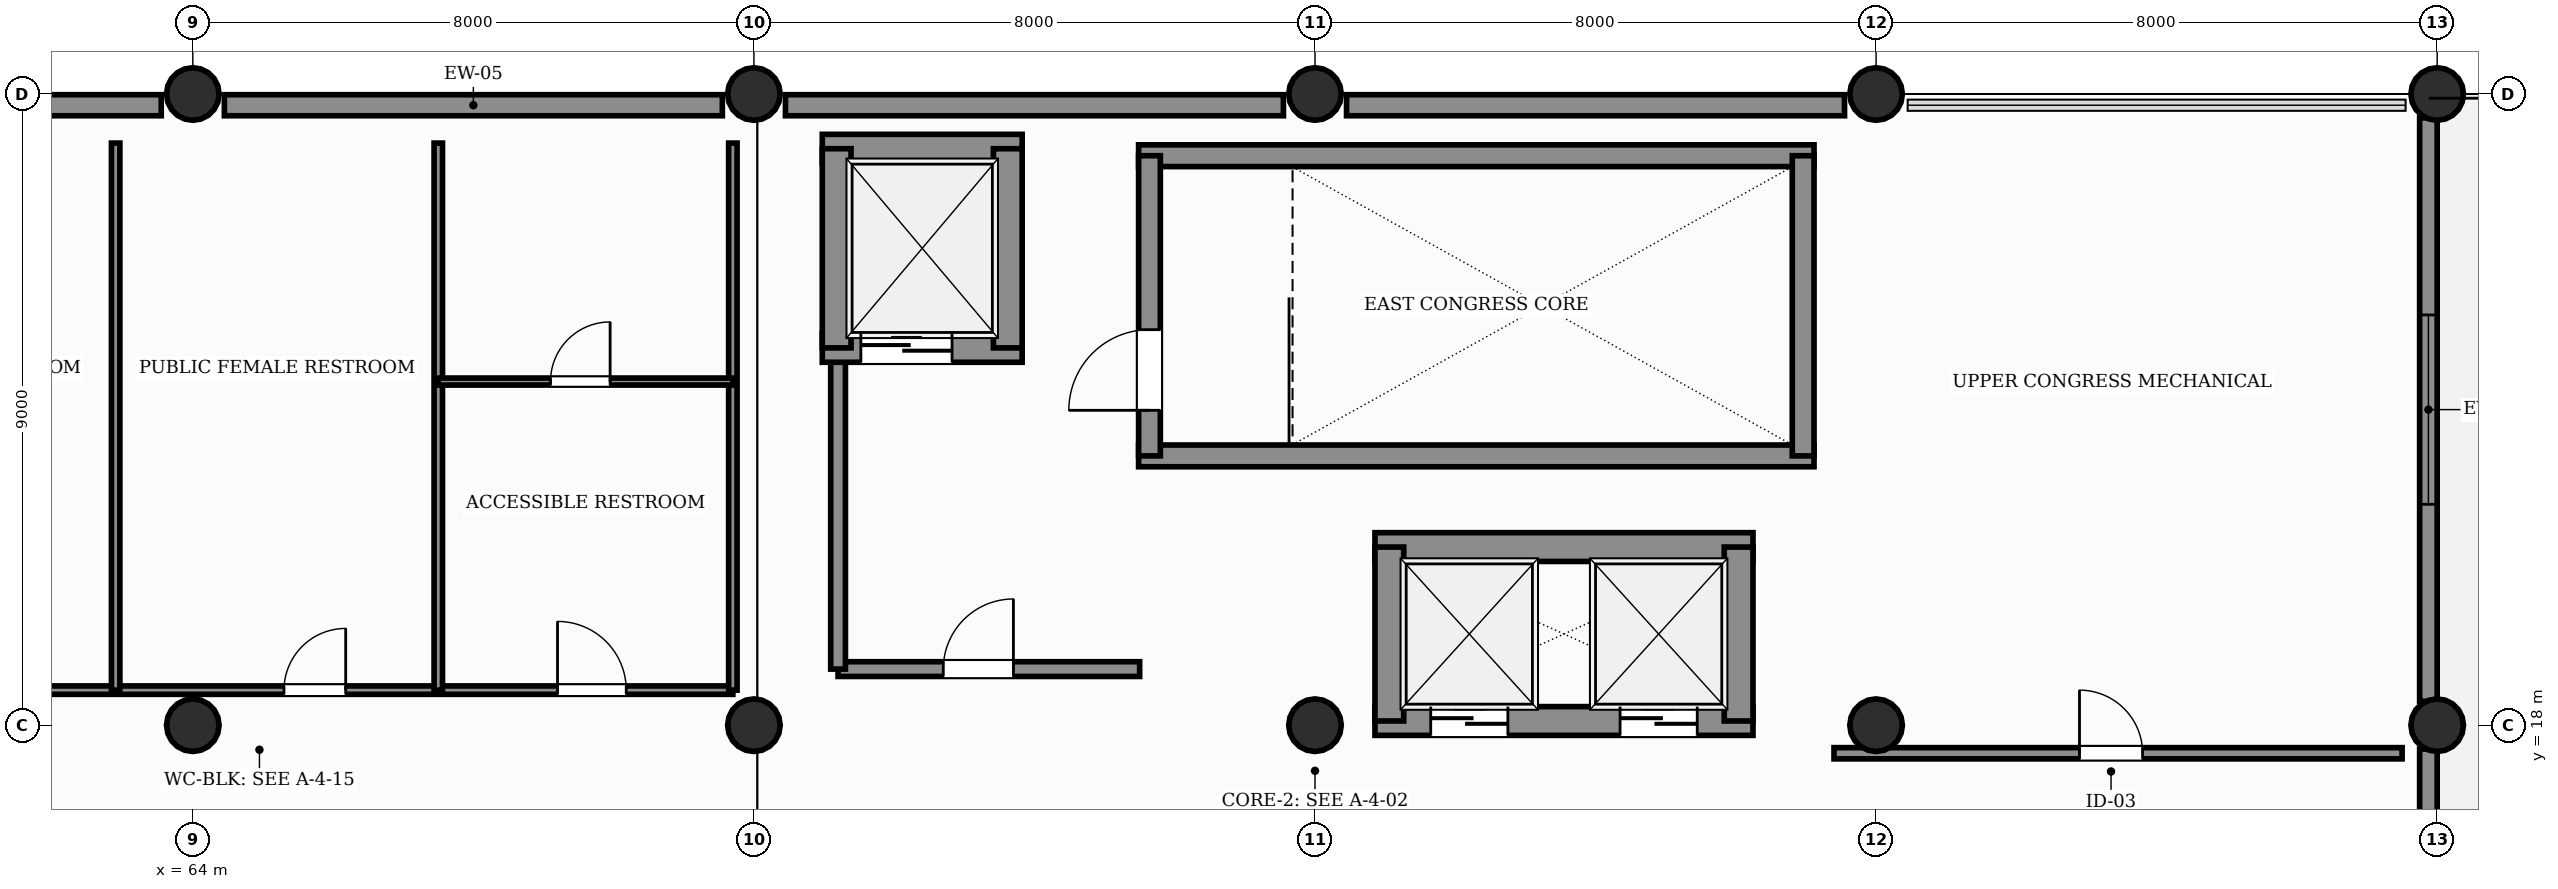
"""IFC4 building model, lengths in metres.
Left out: names, types, materials, properties, quantities, classifications, styles, units other than length and angle.
Written with IfcOpenShell. Run it as: python <this file> out.ifc"""

import sys

from ifc_helpers import new_model, si_unit, direction, frame, frame_2d, origin, origin_2d, place, context, subcontext, project, spatial, rectangle, circle, extrude, element, fill, save


model = new_model("IFC4")
c1 = context("Model", 3, precision=1e-05, world=origin(), true_north=direction((0.0, 1.0)))
c2 = subcontext(c1, "Body", "Model", "MODEL_VIEW")
j1 = project(units=[si_unit("LENGTHUNIT", "METRE"), si_unit("PLANEANGLEUNIT", "RADIAN")], contexts=[c1])
p1 = place(None, origin())
s1 = spatial("IfcSite", under=j1, at=p1, CompositionType="ELEMENT")
p2 = place(p1, origin())
s2 = spatial("IfcBuilding", under=s1, at=p2, CompositionType="ELEMENT")
p3 = place(p2, frame((0.0, 0.0, 21.0)))
s3 = spatial("IfcBuildingStorey", under=s2, at=p3, CompositionType="ELEMENT", Elevation=21.0)
for number, where, z_axis, x_axis in (
    (1, (64.0, 18.0, 0.0), (0.0, 0.0, 1.0), (1.0, 0.0, 0.0)),
    (2, (64.0, 27.0, 0.0), (0.0, 0.0, 1.0), (1.0, 0.0, 0.0)),
    (3, (72.0, 18.0, 0.0), (0.0, 0.0, 1.0), (1.0, 0.0, 0.0)),
    (4, (72.0, 27.0, 0.0), (0.0, 0.0, 1.0), (1.0, 0.0, 0.0)),
    (5, (80.0, 18.0, 0.0), (0.0, 0.0, 1.0), (1.0, 0.0, 0.0)),
    (6, (80.0, 27.0, 0.0), (0.0, 0.0, 1.0), (1.0, 0.0, 0.0)),
    (7, (88.0, 18.0, 0.0), (0.0, 0.0, 1.0), (1.0, 0.0, 0.0)),
    (8, (88.0, 27.0, 0.0), (0.0, 0.0, 1.0), (1.0, 0.0, 0.0)),
    (9, (96.0, 18.0, 0.0), (0.0, 0.0, 1.0), (1.0, 0.0, 0.0)),
    (10, (96.0, 27.0, 0.0), (0.0, 0.0, 1.0), (1.0, 0.0, 0.0)),
):
    element("IfcColumn", number, at=place(p3, frame(where, z_axis=z_axis, x_axis=x_axis)), inside=s3, PredefinedType="COLUMN", context=c2, shape_type="SweptSolid", body=[
        extrude(circle(Radius=0.375, at=origin_2d()), origin(), (0.0, 0.0, 1.0), 4.8),
    ])
for number, where, z_axis, x_axis in (
    (11, (56.45, 26.84, 0.0), (0.0, 0.0, 1.0), (1.0, 0.0, 0.0)),
    (12, (64.45, 26.84, 0.0), (0.0, 0.0, 1.0), (1.0, 0.0, 0.0)),
    (13, (72.45, 26.84, 0.0), (0.0, 0.0, 1.0), (1.0, 0.0, 0.0)),
    (14, (80.45, 26.84, 0.0), (0.0, 0.0, 1.0), (1.0, 0.0, 0.0)),
):
    element("IfcWall", number, at=place(p3, frame(where, z_axis=z_axis, x_axis=x_axis)), inside=s3, PredefinedType="SOLIDWALL", context=c2, shape_type="SweptSolid", body=[
        extrude(rectangle(XDim=7.1, YDim=0.3, at=frame_2d((3.55, 0.0))), origin(), (0.0, 0.0, 1.0), 3.68),
    ])
p4 = place(p3, frame((95.875, 9.34, 0.0), z_axis=(0.0, 0.0, 1.0), x_axis=(0.0, 1.0, 0.0)))
e15 = element("IfcWall", 15, at=p4, inside=s3, PredefinedType="SOLIDWALL", context=c2, shape_type="SweptSolid", body=[
    extrude(rectangle(XDim=8.32, YDim=0.25, at=frame_2d((4.16, 0.0))), origin(), (0.0, 0.0, 1.0), 3.68),
])
p5 = place(p4, frame((3.26, 0.0, 0.0)))
e16 = element("IfcOpeningElement", 16, at=p5, cuts=e15, PredefinedType="OPENING", context=c2, shape_type="SweptSolid", body=[
    extrude(rectangle(XDim=1.8, YDim=2.4, at=frame_2d((0.9, 1.2))), frame((0.0, 0.135, 0.0), z_axis=(0.0, -1.0, 0.0), x_axis=(1.0, 0.0, 0.0)), (0.0, 0.0, 1.0), 0.27),
])
p6 = place(p3, frame((95.875, 18.34, 0.0), z_axis=(0.0, 0.0, 1.0), x_axis=(0.0, 1.0, 0.0)))
e17 = element("IfcWall", 17, at=p6, inside=s3, PredefinedType="SOLIDWALL", context=c2, shape_type="SweptSolid", body=[
    extrude(rectangle(XDim=8.32, YDim=0.25, at=frame_2d((4.16, 0.0))), origin(), (0.0, 0.0, 1.0), 3.68),
])
p7 = place(p6, frame((2.81, 0.0, 0.95)))
e18 = element("IfcOpeningElement", 18, at=p7, cuts=e17, PredefinedType="OPENING", context=c2, shape_type="SweptSolid", body=[
    extrude(rectangle(XDim=2.7, YDim=2.05, at=frame_2d((1.35, 1.025))), frame((0.0, 0.135, 0.0), z_axis=(0.0, -1.0, 0.0), x_axis=(1.0, 0.0, 0.0)), (0.0, 0.0, 1.0), 0.27),
])
for number, where, z_axis, x_axis in (
    (19, (77.485, 21.84, 0.0), (0.0, 0.0, 1.0), (1.0, 0.0, 0.0)),
    (20, (77.485, 26.12, 0.0), (0.0, 0.0, 1.0), (1.0, 0.0, 0.0)),
):
    element("IfcWall", number, at=place(p3, frame(where, z_axis=z_axis, x_axis=x_axis)), inside=s3, PredefinedType="SHEAR", context=c2, shape_type="SweptSolid", body=[
        extrude(rectangle(XDim=9.63, YDim=0.31, at=frame_2d((4.815, 0.0))), origin(), (0.0, 0.0, 1.0), 4.8),
    ])
p8 = place(p3, frame((77.64, 21.84, 0.0), z_axis=(0.0, 0.0, 1.0), x_axis=(0.0, 1.0, 0.0)))
e21 = element("IfcWall", 21, at=p8, inside=s3, PredefinedType="SHEAR", context=c2, shape_type="SweptSolid", body=[
    extrude(rectangle(XDim=4.28, YDim=0.31, at=frame_2d((2.14, 0.0))), origin(), (0.0, 0.0, 1.0), 4.8),
])
p9 = place(p8, frame((0.65, 0.0, 0.0)))
e22 = element("IfcOpeningElement", 22, at=p9, cuts=e21, PredefinedType="OPENING", context=c2, shape_type="SweptSolid", body=[
    extrude(rectangle(XDim=1.15, YDim=2.2, at=frame_2d((0.575, 1.1))), frame((0.0, 0.165, 0.0), z_axis=(0.0, -1.0, 0.0), x_axis=(1.0, 0.0, 0.0)), (0.0, 0.0, 1.0), 0.33),
])
p10 = place(p3, frame((86.96, 21.84, 0.0), z_axis=(0.0, 0.0, 1.0), x_axis=(0.0, 1.0, 0.0)))
e23 = element("IfcWall", 23, at=p10, inside=s3, PredefinedType="SHEAR", context=c2, shape_type="SweptSolid", body=[
    extrude(rectangle(XDim=4.28, YDim=0.31, at=frame_2d((2.14, 0.0))), origin(), (0.0, 0.0, 1.0), 4.8),
])
p11 = place(p3, frame((73.2, 18.8, 0.0), z_axis=(0.0, 0.0, 1.0), x_axis=(1.0, 0.0, 0.0)))
e24 = element("IfcWall", 24, at=p11, inside=s3, PredefinedType="PARTITIONING", context=c2, shape_type="SweptSolid", body=[
    extrude(rectangle(XDim=4.3, YDim=0.21, at=frame_2d((2.15, 0.0))), origin(), (0.0, 0.0, 1.0), 3.6),
])
p12 = place(p11, frame((1.5, 0.0, 0.0)))
e25 = element("IfcOpeningElement", 25, at=p12, cuts=e24, PredefinedType="OPENING", context=c2, shape_type="SweptSolid", body=[
    extrude(rectangle(XDim=1.0, YDim=2.15, at=frame_2d((0.5, 1.075))), frame((0.0, 0.115, 0.0), z_axis=(0.0, -1.0, 0.0), x_axis=(1.0, 0.0, 0.0)), (0.0, 0.0, 1.0), 0.23),
])
p13 = place(p3, frame((73.2, 18.8, 0.0), z_axis=(0.0, 0.0, 1.0), x_axis=(0.0, 1.0, 0.0)))
e26 = element("IfcWall", 26, at=p13, inside=s3, PredefinedType="PARTITIONING", context=c2, shape_type="SweptSolid", body=[
    extrude(rectangle(XDim=4.6, YDim=0.21, at=frame_2d((2.3, 0.0))), origin(), (0.0, 0.0, 1.0), 3.6),
])
p14 = place(p3, frame((72.975, 23.38, 0.0), z_axis=(0.0, 0.0, 1.0), x_axis=(1.0, 0.0, 0.0)))
e27 = element("IfcWall", 27, at=p14, inside=s3, PredefinedType="SHEAR", context=c2, shape_type="SweptSolid", body=[
    extrude(rectangle(XDim=2.85, YDim=0.41, at=frame_2d((1.425, 0.0))), origin(), (0.0, 0.0, 1.0), 4.8),
])
p15 = place(p14, frame((0.55, 0.0, 0.0)))
e28 = element("IfcOpeningElement", 28, at=p15, cuts=e27, PredefinedType="OPENING", context=c2, shape_type="SweptSolid", body=[
    extrude(rectangle(XDim=1.3, YDim=2.25, at=frame_2d((0.65, 1.125))), frame((0.0, 0.215, 0.0), z_axis=(0.0, -1.0, 0.0), x_axis=(1.0, 0.0, 0.0)), (0.0, 0.0, 1.0), 0.43),
])
p16 = place(p3, frame((72.975, 26.22, 0.0), z_axis=(0.0, 0.0, 1.0), x_axis=(1.0, 0.0, 0.0)))
e29 = element("IfcWall", 29, at=p16, inside=s3, PredefinedType="SHEAR", context=c2, shape_type="SweptSolid", body=[
    extrude(rectangle(XDim=2.85, YDim=0.41, at=frame_2d((1.425, 0.0))), origin(), (0.0, 0.0, 1.0), 4.8),
])
for number, where, z_axis, x_axis in (
    (30, (73.18, 23.38, 0.0), (0.0, 0.0, 1.0), (0.0, 1.0, 0.0)),
    (31, (75.62, 23.38, 0.0), (0.0, 0.0, 1.0), (0.0, 1.0, 0.0)),
):
    element("IfcWall", number, at=place(p3, frame(where, z_axis=z_axis, x_axis=x_axis)), inside=s3, PredefinedType="SHEAR", context=c2, shape_type="SweptSolid", body=[
        extrude(rectangle(XDim=2.84, YDim=0.41, at=frame_2d((1.42, 0.0))), origin(), (0.0, 0.0, 1.0), 4.8),
    ])
p17 = place(p3, frame((80.855, 18.06, 0.0), z_axis=(0.0, 0.0, 1.0), x_axis=(1.0, 0.0, 0.0)))
e32 = element("IfcWall", 32, at=p17, inside=s3, PredefinedType="SHEAR", context=c2, shape_type="SweptSolid", body=[
    extrude(rectangle(XDim=5.39, YDim=0.41, at=frame_2d((2.695, 0.0))), origin(), (0.0, 0.0, 1.0), 4.8),
])
p18 = place(p17, frame((0.795, 0.0, 0.0)))
e33 = element("IfcOpeningElement", 33, at=p18, cuts=e32, PredefinedType="OPENING", context=c2, shape_type="SweptSolid", body=[
    extrude(rectangle(XDim=1.1, YDim=2.2, at=frame_2d((0.55, 1.1))), frame((0.0, 0.215, 0.0), z_axis=(0.0, -1.0, 0.0), x_axis=(1.0, 0.0, 0.0)), (0.0, 0.0, 1.0), 0.43),
])
p19 = place(p17, frame((3.495, 0.0, 0.0)))
e34 = element("IfcOpeningElement", 34, at=p19, cuts=e32, PredefinedType="OPENING", context=c2, shape_type="SweptSolid", body=[
    extrude(rectangle(XDim=1.1, YDim=2.2, at=frame_2d((0.55, 1.1))), frame((0.0, 0.215, 0.0), z_axis=(0.0, -1.0, 0.0), x_axis=(1.0, 0.0, 0.0)), (0.0, 0.0, 1.0), 0.43),
])
p20 = place(p3, frame((80.855, 20.54, 0.0), z_axis=(0.0, 0.0, 1.0), x_axis=(1.0, 0.0, 0.0)))
e35 = element("IfcWall", 35, at=p20, inside=s3, PredefinedType="SHEAR", context=c2, shape_type="SweptSolid", body=[
    extrude(rectangle(XDim=5.39, YDim=0.41, at=frame_2d((2.695, 0.0))), origin(), (0.0, 0.0, 1.0), 4.8),
])
for number, where, z_axis, x_axis in (
    (36, (81.06, 18.06, 0.0), (0.0, 0.0, 1.0), (0.0, 1.0, 0.0)),
    (37, (86.04, 18.06, 0.0), (0.0, 0.0, 1.0), (0.0, 1.0, 0.0)),
):
    element("IfcWall", number, at=place(p3, frame(where, z_axis=z_axis, x_axis=x_axis)), inside=s3, PredefinedType="SHEAR", context=c2, shape_type="SweptSolid", body=[
        extrude(rectangle(XDim=2.48, YDim=0.41, at=frame_2d((1.24, 0.0))), origin(), (0.0, 0.0, 1.0), 4.8),
    ])
p21 = place(p3, frame((58.3, 18.5, 0.0), z_axis=(0.0, 0.0, 1.0), x_axis=(1.0, 0.0, 0.0)))
e38 = element("IfcWall", 38, at=p21, inside=s3, PredefinedType="PARTITIONING", context=c2, shape_type="SweptSolid", body=[
    extrude(rectangle(XDim=13.4, YDim=0.12, at=frame_2d((6.7, 0.0))), origin(), (0.0, 0.0, 1.0), 3.6),
])
p22 = place(p21, frame((1.8, 0.0, 0.0)))
e39 = element("IfcOpeningElement", 39, at=p22, cuts=e38, PredefinedType="OPENING", context=c2, shape_type="SweptSolid", body=[
    extrude(rectangle(XDim=0.88, YDim=2.1, at=frame_2d((0.44, 1.05))), frame((0.0, 0.07, 0.0), z_axis=(0.0, -1.0, 0.0), x_axis=(1.0, 0.0, 0.0)), (0.0, 0.0, 1.0), 0.14),
])
p23 = place(p21, frame((7.0, 0.0, 0.0)))
e40 = element("IfcOpeningElement", 40, at=p23, cuts=e38, PredefinedType="OPENING", context=c2, shape_type="SweptSolid", body=[
    extrude(rectangle(XDim=0.88, YDim=2.1, at=frame_2d((0.44, 1.05))), frame((0.0, 0.07, 0.0), z_axis=(0.0, -1.0, 0.0), x_axis=(1.0, 0.0, 0.0)), (0.0, 0.0, 1.0), 0.14),
])
p24 = place(p21, frame((10.9, 0.0, 0.0)))
e41 = element("IfcOpeningElement", 41, at=p24, cuts=e38, PredefinedType="OPENING", context=c2, shape_type="SweptSolid", body=[
    extrude(rectangle(XDim=0.98, YDim=2.15, at=frame_2d((0.49, 1.075))), frame((0.0, 0.07, 0.0), z_axis=(0.0, -1.0, 0.0), x_axis=(1.0, 0.0, 0.0)), (0.0, 0.0, 1.0), 0.14),
])
for number, where, z_axis, x_axis in (
    (42, (62.9, 18.5, 0.0), (0.0, 0.0, 1.0), (0.0, 1.0, 0.0)),
    (43, (67.5, 18.5, 0.0), (0.0, 0.0, 1.0), (0.0, 1.0, 0.0)),
    (44, (71.7, 18.5, 0.0), (0.0, 0.0, 1.0), (0.0, 1.0, 0.0)),
):
    element("IfcWall", number, at=place(p3, frame(where, z_axis=z_axis, x_axis=x_axis)), inside=s3, PredefinedType="PARTITIONING", context=c2, shape_type="SweptSolid", body=[
        extrude(rectangle(XDim=7.8, YDim=0.12, at=frame_2d((3.9, 0.0))), origin(), (0.0, 0.0, 1.0), 3.6),
    ])
p25 = place(p3, frame((67.5, 22.9, 0.0), z_axis=(0.0, 0.0, 1.0), x_axis=(1.0, 0.0, 0.0)))
e45 = element("IfcWall", 45, at=p25, inside=s3, PredefinedType="PARTITIONING", context=c2, shape_type="SweptSolid", body=[
    extrude(rectangle(XDim=4.2, YDim=0.1, at=frame_2d((2.1, 0.0))), origin(), (0.0, 0.0, 1.0), 3.6),
])
p26 = place(p25, frame((1.6, 0.0, 0.0)))
e46 = element("IfcOpeningElement", 46, at=p26, cuts=e45, PredefinedType="OPENING", context=c2, shape_type="SweptSolid", body=[
    extrude(rectangle(XDim=0.85, YDim=2.1, at=frame_2d((0.425, 1.05))), frame((0.0, 0.06, 0.0), z_axis=(0.0, -1.0, 0.0), x_axis=(1.0, 0.0, 0.0)), (0.0, 0.0, 1.0), 0.12),
])
p27 = place(p3, frame((87.4, 17.6, 0.0), z_axis=(0.0, 0.0, 1.0), x_axis=(1.0, 0.0, 0.0)))
e47 = element("IfcWall", 47, at=p27, inside=s3, PredefinedType="PARTITIONING", context=c2, shape_type="SweptSolid", body=[
    extrude(rectangle(XDim=8.1, YDim=0.16, at=frame_2d((4.05, 0.0))), origin(), (0.0, 0.0, 1.0), 3.6),
])
p28 = place(p27, frame((3.5, 0.0, 0.0)))
e48 = element("IfcOpeningElement", 48, at=p28, cuts=e47, PredefinedType="OPENING", context=c2, shape_type="SweptSolid", body=[
    extrude(rectangle(XDim=0.9, YDim=2.15, at=frame_2d((0.45, 1.075))), frame((0.0, 0.09, 0.0), z_axis=(0.0, -1.0, 0.0), x_axis=(1.0, 0.0, 0.0)), (0.0, 0.0, 1.0), 0.18),
])
p29 = place(p7, origin())
e49 = element("IfcWindow", 49, at=p29, inside=s3, PartitioningType="SINGLE_PANEL", PredefinedType="WINDOW", context=c2, shape_type="SweptSolid", body=[
    extrude(rectangle(XDim=2.7, YDim=2.05, at=frame_2d((1.35, 1.025))), frame((0.0, 0.03, 0.0), z_axis=(0.0, -1.0, 0.0), x_axis=(1.0, 0.0, 0.0)), (0.0, 0.0, 1.0), 0.06),
])
fill(e18, e49)
p30 = place(p9, origin())
e50 = element("IfcDoor", 50, at=p30, inside=s3, OperationType="SINGLE_SWING_LEFT", PredefinedType="DOOR", context=c2, shape_type="SweptSolid", body=[
    extrude(rectangle(XDim=1.15, YDim=2.2, at=frame_2d((0.575, 1.1))), frame((0.0, 0.025, 0.0), z_axis=(0.0, -1.0, 0.0), x_axis=(1.0, 0.0, 0.0)), (0.0, 0.0, 1.0), 0.05),
])
fill(e22, e50)
p31 = place(p12, origin())
e51 = element("IfcDoor", 51, at=p31, inside=s3, OperationType="SINGLE_SWING_RIGHT", PredefinedType="DOOR", context=c2, shape_type="SweptSolid", body=[
    extrude(rectangle(XDim=1.0, YDim=2.15, at=frame_2d((0.5, 1.075))), frame((0.0, 0.025, 0.0), z_axis=(0.0, -1.0, 0.0), x_axis=(1.0, 0.0, 0.0)), (0.0, 0.0, 1.0), 0.05),
])
fill(e25, e51)
p32 = place(p15, origin())
e52 = element("IfcDoor", 52, at=p32, inside=s3, OperationType="DOUBLE_DOOR_SLIDING", PredefinedType="DOOR", context=c2, shape_type="SweptSolid", body=[
    extrude(rectangle(XDim=1.3, YDim=2.25, at=frame_2d((0.65, 1.125))), frame((0.0, 0.025, 0.0), z_axis=(0.0, -1.0, 0.0), x_axis=(1.0, 0.0, 0.0)), (0.0, 0.0, 1.0), 0.05),
])
fill(e28, e52)
p33 = place(p18, origin())
e53 = element("IfcDoor", 53, at=p33, inside=s3, OperationType="DOUBLE_DOOR_SLIDING", PredefinedType="DOOR", context=c2, shape_type="SweptSolid", body=[
    extrude(rectangle(XDim=1.1, YDim=2.2, at=frame_2d((0.55, 1.1))), frame((0.0, 0.025, 0.0), z_axis=(0.0, -1.0, 0.0), x_axis=(1.0, 0.0, 0.0)), (0.0, 0.0, 1.0), 0.05),
])
fill(e33, e53)
p34 = place(p19, origin())
e54 = element("IfcDoor", 54, at=p34, inside=s3, OperationType="DOUBLE_DOOR_SLIDING", PredefinedType="DOOR", context=c2, shape_type="SweptSolid", body=[
    extrude(rectangle(XDim=1.1, YDim=2.2, at=frame_2d((0.55, 1.1))), frame((0.0, 0.025, 0.0), z_axis=(0.0, -1.0, 0.0), x_axis=(1.0, 0.0, 0.0)), (0.0, 0.0, 1.0), 0.05),
])
fill(e34, e54)
p35 = place(p23, origin())
e55 = element("IfcDoor", 55, at=p35, inside=s3, OperationType="SINGLE_SWING_RIGHT", PredefinedType="DOOR", context=c2, shape_type="SweptSolid", body=[
    extrude(rectangle(XDim=0.88, YDim=2.1, at=frame_2d((0.44, 1.05))), frame((0.0, 0.025, 0.0), z_axis=(0.0, -1.0, 0.0), x_axis=(1.0, 0.0, 0.0)), (0.0, 0.0, 1.0), 0.05),
])
fill(e40, e55)
p36 = place(p24, origin())
e56 = element("IfcDoor", 56, at=p36, inside=s3, OperationType="SINGLE_SWING_LEFT", PredefinedType="DOOR", context=c2, shape_type="SweptSolid", body=[
    extrude(rectangle(XDim=0.98, YDim=2.15, at=frame_2d((0.49, 1.075))), frame((0.0, 0.025, 0.0), z_axis=(0.0, -1.0, 0.0), x_axis=(1.0, 0.0, 0.0)), (0.0, 0.0, 1.0), 0.05),
])
fill(e41, e56)
p37 = place(p26, origin())
e57 = element("IfcDoor", 57, at=p37, inside=s3, OperationType="SINGLE_SWING_RIGHT", PredefinedType="DOOR", context=c2, shape_type="SweptSolid", body=[
    extrude(rectangle(XDim=0.85, YDim=2.1, at=frame_2d((0.425, 1.05))), frame((0.0, 0.025, 0.0), z_axis=(0.0, -1.0, 0.0), x_axis=(1.0, 0.0, 0.0)), (0.0, 0.0, 1.0), 0.05),
])
fill(e46, e57)
p38 = place(p28, origin())
e58 = element("IfcDoor", 58, at=p38, inside=s3, OperationType="SINGLE_SWING_LEFT", PredefinedType="DOOR", context=c2, shape_type="SweptSolid", body=[
    extrude(rectangle(XDim=0.9, YDim=2.15, at=frame_2d((0.45, 1.075))), frame((0.0, 0.025, 0.0), z_axis=(0.0, -1.0, 0.0), x_axis=(1.0, 0.0, 0.0)), (0.0, 0.0, 1.0), 0.05),
])
fill(e48, e58)
save(model, sys.argv[1])
